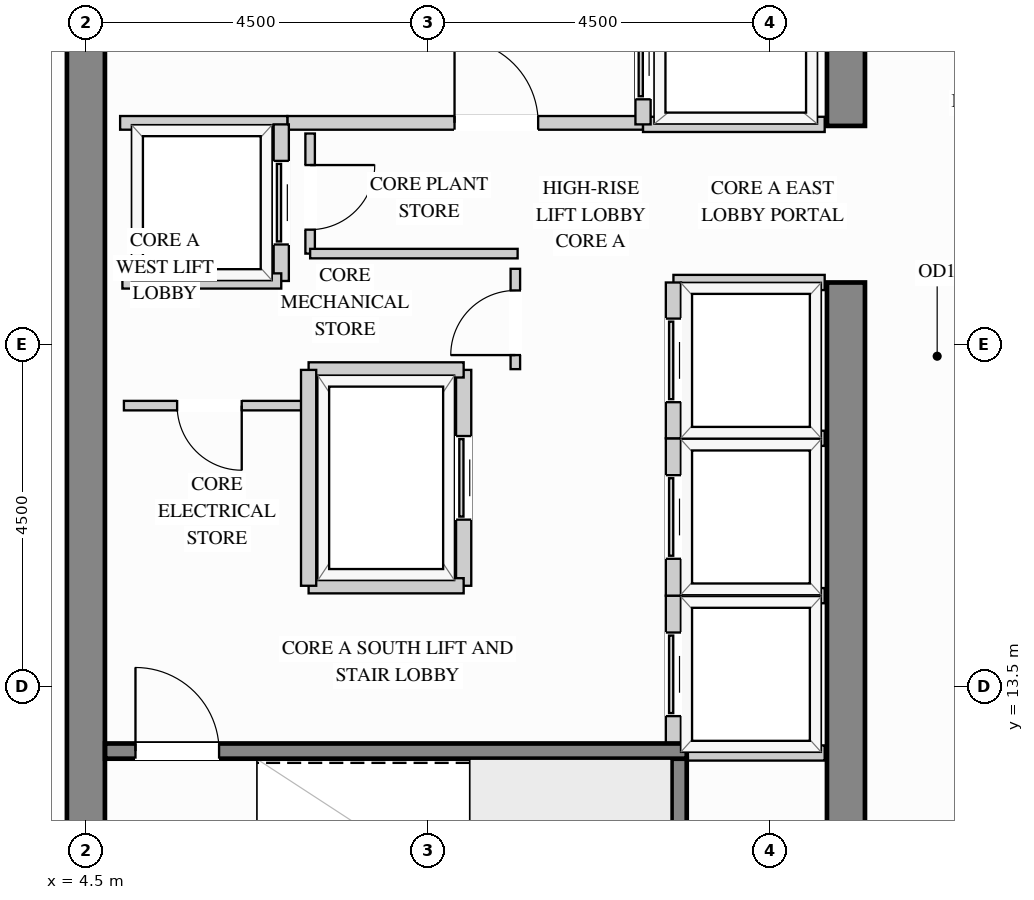
"""IFC4 building model, lengths in metres.
Left out: names, types, materials, properties, quantities, classifications, styles, units other than length and angle.
Written with IfcOpenShell. Run it as: python <this file> out.ifc"""

import sys

from ifc_helpers import new_model, si_unit, direction, frame, frame_2d, origin, place, context, subcontext, project, spatial, rectangle, extrude, source, transform, mapped, element, fill, save


model = new_model("IFC4")
c1 = context("Model", 3, precision=1e-05, world=origin(), true_north=direction((0.0, 1.0)))
c2 = subcontext(c1, "Body", "Model", "MODEL_VIEW")
j1 = project(units=[si_unit("LENGTHUNIT", "METRE"), si_unit("PLANEANGLEUNIT", "RADIAN")], contexts=[c1])
p1 = place(None, origin())
s1 = spatial("IfcSite", under=j1, at=p1, CompositionType="ELEMENT")
p2 = place(p1, origin())
s2 = spatial("IfcBuilding", under=s1, at=p2, CompositionType="ELEMENT")
p3 = place(p2, frame((0.0, 0.0, 262.8)))
s3 = spatial("IfcBuildingStorey", under=s2, at=p3, CompositionType="ELEMENT", Elevation=262.8)
m1 = source(origin(), c2, "Body", "SweptSolid", [
    extrude(rectangle(XDim=10.07, YDim=0.5, at=frame_2d((5.035, 0.0))), origin(), (0.0, 0.0, 1.0), 3.4),
])
p4 = place(p3, frame((14.5, 8.75, 0.0), z_axis=(0.0, 0.0, 1.0), x_axis=(0.0, 1.0, 0.0)))
e1 = element("IfcWall", 1, at=p4, inside=s3, PredefinedType="SHEAR", context=c2, shape_type="MappedRepresentation", body=[
    mapped(m1, transform((0.0, 0.0, 0.0), x_axis=(1.0, 0.0, 0.0), y_axis=(0.0, 1.0, 0.0), z_axis=(0.0, 0.0, 1.0))),
])
m2 = source(origin(), c2, "Body", "SweptSolid", [
    extrude(rectangle(XDim=8.37, YDim=0.5, at=frame_2d((4.185, 0.0))), origin(), (0.0, 0.0, 1.0), 3.4),
])
p5 = place(p3, frame((14.5, 20.88, 0.0), z_axis=(0.0, 0.0, 1.0), x_axis=(0.0, 1.0, 0.0)))
e2 = element("IfcWall", 2, at=p5, inside=s3, PredefinedType="SHEAR", context=c2, shape_type="MappedRepresentation", body=[
    mapped(m2, transform((0.0, 0.0, 0.0), x_axis=(1.0, 0.0, 0.0), y_axis=(0.0, 1.0, 0.0), z_axis=(0.0, 0.0, 1.0))),
])
m3 = source(origin(), c2, "Body", "SweptSolid", [
    extrude(rectangle(XDim=20.5, YDim=0.5, at=frame_2d((10.25, 0.0))), origin(), (0.0, 0.0, 1.0), 3.4),
])
p6 = place(p3, frame((4.5, 8.75, 0.0), z_axis=(0.0, 0.0, 1.0), x_axis=(0.0, 1.0, 0.0)))
e3 = element("IfcWall", 3, at=p6, inside=s3, PredefinedType="SHEAR", context=c2, shape_type="MappedRepresentation", body=[
    mapped(m3, transform((0.0, 0.0, 0.0), x_axis=(1.0, 0.0, 0.0), y_axis=(0.0, 1.0, 0.0), z_axis=(0.0, 0.0, 1.0))),
])
p7 = place(p3, frame((7.15, 20.92, 0.0), z_axis=(0.0, 0.0, 1.0), x_axis=(1.0, 0.0, 0.0)))
e4 = element("IfcWall", 4, at=p7, inside=s3, PredefinedType="PARTITIONING", context=c2, shape_type="SweptSolid", body=[
    extrude(rectangle(XDim=4.68, YDim=0.18, at=frame_2d((2.34, 0.0))), origin(), (0.0, 0.0, 1.0), 3.385),
])
p8 = place(p7, frame((2.2, 0.0, 0.0)))
e5 = element("IfcOpeningElement", 5, at=p8, cuts=e4, PredefinedType="OPENING", context=c2, shape_type="SweptSolid", body=[
    extrude(rectangle(XDim=1.1, YDim=2.15, at=frame_2d((0.55, 1.075))), frame((0.0, 0.1, 0.0), z_axis=(0.0, -1.0, 0.0), x_axis=(1.0, 0.0, 0.0)), (0.0, 0.0, 1.0), 0.2),
])
m4 = source(origin(), c2, "Body", "SweptSolid", [
    extrude(rectangle(XDim=2.2, YDim=0.18, at=frame_2d((1.1, 0.0))), origin(), (0.0, 0.0, 1.0), 3.385),
])
p9 = place(p3, frame((4.95, 20.92, 0.0), z_axis=(0.0, 0.0, 1.0), x_axis=(1.0, 0.0, 0.0)))
e6 = element("IfcWall", 6, at=p9, inside=s3, PredefinedType="PARTITIONING", context=c2, shape_type="MappedRepresentation", body=[
    mapped(m4, transform((0.0, 0.0, 0.0), x_axis=(1.0, 0.0, 0.0), y_axis=(0.0, 1.0, 0.0), z_axis=(0.0, 0.0, 1.0))),
])
p10 = place(p3, frame((10.15, 17.68, 0.0), z_axis=(0.0, 0.0, 1.0), x_axis=(0.0, 1.0, 0.0)))
e7 = element("IfcWall", 7, at=p10, inside=s3, PredefinedType="PARTITIONING", context=c2, shape_type="SweptSolid", body=[
    extrude(rectangle(XDim=1.32, YDim=0.125, at=frame_2d((0.66, 0.0))), origin(), (0.0, 0.0, 1.0), 3.385),
])
p11 = place(p10, frame((0.185, 0.0, 0.0)))
e8 = element("IfcOpeningElement", 8, at=p11, cuts=e7, PredefinedType="OPENING", context=c2, shape_type="SweptSolid", body=[
    extrude(rectangle(XDim=0.85, YDim=2.1, at=frame_2d((0.425, 1.05))), frame((0.0, 0.073, 0.0), z_axis=(0.0, -1.0, 0.0), x_axis=(1.0, 0.0, 0.0)), (0.0, 0.0, 1.0), 0.145),
])
p12 = place(p3, frame((7.45, 19.2, 0.0), z_axis=(0.0, 0.0, 1.0), x_axis=(0.0, 1.0, 0.0)))
e9 = element("IfcWall", 9, at=p12, inside=s3, PredefinedType="PARTITIONING", context=c2, shape_type="SweptSolid", body=[
    extrude(rectangle(XDim=1.58, YDim=0.125, at=frame_2d((0.79, 0.0))), origin(), (0.0, 0.0, 1.0), 3.385),
])
p13 = place(p12, frame((0.315, 0.0, 0.0)))
e10 = element("IfcOpeningElement", 10, at=p13, cuts=e9, PredefinedType="OPENING", context=c2, shape_type="SweptSolid", body=[
    extrude(rectangle(XDim=0.85, YDim=2.1, at=frame_2d((0.425, 1.05))), frame((0.0, 0.073, 0.0), z_axis=(0.0, -1.0, 0.0), x_axis=(1.0, 0.0, 0.0)), (0.0, 0.0, 1.0), 0.145),
])
m5 = source(origin(), c2, "Body", "SweptSolid", [
    extrude(rectangle(XDim=2.73, YDim=0.125, at=frame_2d((1.365, 0.0))), origin(), (0.0, 0.0, 1.0), 3.385),
])
p14 = place(p3, frame((7.45, 19.2, 0.0), z_axis=(0.0, 0.0, 1.0), x_axis=(1.0, 0.0, 0.0)))
e11 = element("IfcWall", 11, at=p14, inside=s3, PredefinedType="PARTITIONING", context=c2, shape_type="MappedRepresentation", body=[
    mapped(m5, transform((0.0, 0.0, 0.0), x_axis=(1.0, 0.0, 0.0), y_axis=(0.0, 1.0, 0.0), z_axis=(0.0, 0.0, 1.0))),
])
p15 = place(p3, frame((5.0, 17.2, 0.0), z_axis=(0.0, 0.0, 1.0), x_axis=(1.0, 0.0, 0.0)))
e12 = element("IfcWall", 12, at=p15, inside=s3, PredefinedType="PARTITIONING", context=c2, shape_type="SweptSolid", body=[
    extrude(rectangle(XDim=2.4, YDim=0.125, at=frame_2d((1.2, 0.0))), origin(), (0.0, 0.0, 1.0), 3.385),
])
p16 = place(p15, frame((0.7, 0.0, 0.0)))
e13 = element("IfcOpeningElement", 13, at=p16, cuts=e12, PredefinedType="OPENING", context=c2, shape_type="SweptSolid", body=[
    extrude(rectangle(XDim=0.85, YDim=2.1, at=frame_2d((0.425, 1.05))), frame((0.0, 0.073, 0.0), z_axis=(0.0, -1.0, 0.0), x_axis=(1.0, 0.0, 0.0)), (0.0, 0.0, 1.0), 0.145),
])
m6 = source(origin(), c2, "Body", "SweptSolid", [
    extrude(rectangle(XDim=2.39, YDim=0.2, at=frame_2d((1.195, 0.0))), origin(), (0.0, 0.0, 1.0), 3.385),
])
p17 = place(p3, frame((11.83, 20.9, 0.0), z_axis=(0.0, 0.0, 1.0), x_axis=(1.0, 0.0, 0.0)))
e14 = element("IfcWall", 14, at=p17, inside=s3, PredefinedType="PARTITIONING", context=c2, shape_type="MappedRepresentation", body=[
    mapped(m6, transform((0.0, 0.0, 0.0), x_axis=(1.0, 0.0, 0.0), y_axis=(0.0, 1.0, 0.0), z_axis=(0.0, 0.0, 1.0))),
])
p18 = place(p3, frame((11.83, 20.9, 0.0), z_axis=(0.0, 0.0, 1.0), x_axis=(0.0, 1.0, 0.0)))
e15 = element("IfcWall", 15, at=p18, inside=s3, PredefinedType="PARTITIONING", context=c2, shape_type="SweptSolid", body=[
    extrude(rectangle(XDim=1.76, YDim=0.2, at=frame_2d((0.88, 0.0))), origin(), (0.0, 0.0, 1.0), 3.385),
])
p19 = place(p18, frame((0.33, 0.0, 0.0)))
e16 = element("IfcOpeningElement", 16, at=p19, cuts=e15, PredefinedType="OPENING", context=c2, shape_type="SweptSolid", body=[
    extrude(rectangle(XDim=1.1, YDim=2.2, at=frame_2d((0.55, 1.1))), frame((0.0, 0.11, 0.0), z_axis=(0.0, -1.0, 0.0), x_axis=(1.0, 0.0, 0.0)), (0.0, 0.0, 1.0), 0.22),
])
m7 = source(origin(), c2, "Body", "SweptSolid", [
    extrude(rectangle(XDim=1.99, YDim=0.2, at=frame_2d((0.995, 0.0))), origin(), (0.0, 0.0, 1.0), 3.385),
])
for number, where, z_axis, x_axis in (
    (17, (12.23, 14.7, 0.0), (0.0, 0.0, 1.0), (1.0, 0.0, 0.0)),
    (18, (12.23, 12.63, 0.0), (0.0, 0.0, 1.0), (1.0, 0.0, 0.0)),
):
    element("IfcWall", number, at=place(p3, frame(where, z_axis=z_axis, x_axis=x_axis)), inside=s3, PredefinedType="PARTITIONING", context=c2, shape_type="MappedRepresentation", body=[
        mapped(m7, transform((0.0, 0.0, 0.0), x_axis=(1.0, 0.0, 0.0), y_axis=(0.0, 1.0, 0.0), z_axis=(0.0, 0.0, 1.0))),
    ])
p20 = place(p3, frame((12.23, 12.63, 0.0), z_axis=(0.0, 0.0, 1.0), x_axis=(0.0, 1.0, 0.0)))
e19 = element("IfcWall", 19, at=p20, inside=s3, PredefinedType="PARTITIONING", context=c2, shape_type="SweptSolid", body=[
    extrude(rectangle(XDim=2.07, YDim=0.2, at=frame_2d((1.035, 0.0))), origin(), (0.0, 0.0, 1.0), 3.385),
])
p21 = place(p20, frame((0.485, 0.0, 0.0)))
e20 = element("IfcOpeningElement", 20, at=p21, cuts=e19, PredefinedType="OPENING", context=c2, shape_type="SweptSolid", body=[
    extrude(rectangle(XDim=1.1, YDim=2.2, at=frame_2d((0.55, 1.1))), frame((0.0, 0.11, 0.0), z_axis=(0.0, -1.0, 0.0), x_axis=(1.0, 0.0, 0.0)), (0.0, 0.0, 1.0), 0.22),
])
p22 = place(p3, frame((12.23, 16.77, 0.0), z_axis=(0.0, 0.0, 1.0), x_axis=(1.0, 0.0, 0.0)))
e21 = element("IfcWall", 21, at=p22, inside=s3, PredefinedType="PARTITIONING", context=c2, shape_type="MappedRepresentation", body=[
    mapped(m7, transform((0.0, 0.0, 0.0), x_axis=(1.0, 0.0, 0.0), y_axis=(0.0, 1.0, 0.0), z_axis=(0.0, 0.0, 1.0))),
])
p23 = place(p3, frame((12.23, 14.7, 0.0), z_axis=(0.0, 0.0, 1.0), x_axis=(0.0, 1.0, 0.0)))
e22 = element("IfcWall", 22, at=p23, inside=s3, PredefinedType="PARTITIONING", context=c2, shape_type="SweptSolid", body=[
    extrude(rectangle(XDim=2.07, YDim=0.2, at=frame_2d((1.035, 0.0))), origin(), (0.0, 0.0, 1.0), 3.385),
])
p24 = place(p23, frame((0.485, 0.0, 0.0)))
e23 = element("IfcOpeningElement", 23, at=p24, cuts=e22, PredefinedType="OPENING", context=c2, shape_type="SweptSolid", body=[
    extrude(rectangle(XDim=1.1, YDim=2.2, at=frame_2d((0.55, 1.1))), frame((0.0, 0.11, 0.0), z_axis=(0.0, -1.0, 0.0), x_axis=(1.0, 0.0, 0.0)), (0.0, 0.0, 1.0), 0.22),
])
p25 = place(p3, frame((12.23, 18.82, 0.0), z_axis=(0.0, 0.0, 1.0), x_axis=(1.0, 0.0, 0.0)))
e24 = element("IfcWall", 24, at=p25, inside=s3, PredefinedType="PARTITIONING", context=c2, shape_type="MappedRepresentation", body=[
    mapped(m7, transform((0.0, 0.0, 0.0), x_axis=(1.0, 0.0, 0.0), y_axis=(0.0, 1.0, 0.0), z_axis=(0.0, 0.0, 1.0))),
])
p26 = place(p3, frame((12.23, 16.77, 0.0), z_axis=(0.0, 0.0, 1.0), x_axis=(0.0, 1.0, 0.0)))
e25 = element("IfcWall", 25, at=p26, inside=s3, PredefinedType="PARTITIONING", context=c2, shape_type="SweptSolid", body=[
    extrude(rectangle(XDim=2.05, YDim=0.2, at=frame_2d((1.025, 0.0))), origin(), (0.0, 0.0, 1.0), 3.385),
])
p27 = place(p26, frame((0.475, 0.0, 0.0)))
e26 = element("IfcOpeningElement", 26, at=p27, cuts=e25, PredefinedType="OPENING", context=c2, shape_type="SweptSolid", body=[
    extrude(rectangle(XDim=1.1, YDim=2.2, at=frame_2d((0.55, 1.1))), frame((0.0, 0.11, 0.0), z_axis=(0.0, -1.0, 0.0), x_axis=(1.0, 0.0, 0.0)), (0.0, 0.0, 1.0), 0.22),
])
p28 = place(p3, frame((7.07, 18.84, 0.0), z_axis=(0.0, 0.0, 1.0), x_axis=(0.0, 1.0, 0.0)))
e27 = element("IfcWall", 27, at=p28, inside=s3, PredefinedType="PARTITIONING", context=c2, shape_type="SweptSolid", body=[
    extrude(rectangle(XDim=2.06, YDim=0.2, at=frame_2d((1.03, 0.0))), origin(), (0.0, 0.0, 1.0), 3.385),
])
p29 = place(p28, frame((0.48, 0.0, 0.0)))
e28 = element("IfcOpeningElement", 28, at=p29, cuts=e27, PredefinedType="OPENING", context=c2, shape_type="SweptSolid", body=[
    extrude(rectangle(XDim=1.1, YDim=2.2, at=frame_2d((0.55, 1.1))), frame((0.0, 0.11, 0.0), z_axis=(0.0, -1.0, 0.0), x_axis=(1.0, 0.0, 0.0)), (0.0, 0.0, 1.0), 0.22),
])
m8 = source(origin(), c2, "Body", "SweptSolid", [
    extrude(rectangle(XDim=2.09, YDim=0.2, at=frame_2d((1.045, 0.0))), origin(), (0.0, 0.0, 1.0), 3.385),
])
p30 = place(p3, frame((4.98, 18.84, 0.0), z_axis=(0.0, 0.0, 1.0), x_axis=(1.0, 0.0, 0.0)))
e29 = element("IfcWall", 29, at=p30, inside=s3, PredefinedType="PARTITIONING", context=c2, shape_type="MappedRepresentation", body=[
    mapped(m8, transform((0.0, 0.0, 0.0), x_axis=(1.0, 0.0, 0.0), y_axis=(0.0, 1.0, 0.0), z_axis=(0.0, 0.0, 1.0))),
])
p31 = place(p3, frame((9.47, 14.83, 0.0), z_axis=(0.0, 0.0, 1.0), x_axis=(0.0, 1.0, 0.0)))
e30 = element("IfcWall", 30, at=p31, inside=s3, PredefinedType="PARTITIONING", context=c2, shape_type="SweptSolid", body=[
    extrude(rectangle(XDim=2.84, YDim=0.2, at=frame_2d((1.42, 0.0))), origin(), (0.0, 0.0, 1.0), 3.385),
])
p32 = place(p31, frame((0.87, 0.0, 0.0)))
e31 = element("IfcOpeningElement", 31, at=p32, cuts=e30, PredefinedType="OPENING", context=c2, shape_type="SweptSolid", body=[
    extrude(rectangle(XDim=1.1, YDim=2.2, at=frame_2d((0.55, 1.1))), frame((0.0, 0.11, 0.0), z_axis=(0.0, -1.0, 0.0), x_axis=(1.0, 0.0, 0.0)), (0.0, 0.0, 1.0), 0.22),
])
m9 = source(origin(), c2, "Body", "SweptSolid", [
    extrude(rectangle(XDim=2.04, YDim=0.2, at=frame_2d((1.02, 0.0))), origin(), (0.0, 0.0, 1.0), 3.385),
])
for number, where, z_axis, x_axis in (
    (32, (7.43, 17.67, 0.0), (0.0, 0.0, 1.0), (1.0, 0.0, 0.0)),
    (33, (7.43, 14.83, 0.0), (0.0, 0.0, 1.0), (1.0, 0.0, 0.0)),
):
    element("IfcWall", number, at=place(p3, frame(where, z_axis=z_axis, x_axis=x_axis)), inside=s3, PredefinedType="PARTITIONING", context=c2, shape_type="MappedRepresentation", body=[
        mapped(m9, transform((0.0, 0.0, 0.0), x_axis=(1.0, 0.0, 0.0), y_axis=(0.0, 1.0, 0.0), z_axis=(0.0, 0.0, 1.0))),
    ])
m10 = source(origin(), c2, "Body", "SweptSolid", [
    extrude(rectangle(XDim=2.84, YDim=0.2, at=frame_2d((1.42, 0.0))), origin(), (0.0, 0.0, 1.0), 3.385),
])
p33 = place(p3, frame((7.43, 14.83, 0.0), z_axis=(0.0, 0.0, 1.0), x_axis=(0.0, 1.0, 0.0)))
e34 = element("IfcWall", 34, at=p33, inside=s3, PredefinedType="PARTITIONING", context=c2, shape_type="MappedRepresentation", body=[
    mapped(m10, transform((0.0, 0.0, 0.0), x_axis=(1.0, 0.0, 0.0), y_axis=(0.0, 1.0, 0.0), z_axis=(0.0, 0.0, 1.0))),
])
m11 = source(origin(), c2, "Body", "SweptSolid", [
    extrude(rectangle(XDim=3.803, YDim=0.2, at=frame_2d((1.901, 0.0))), origin(), (0.0, 0.0, 1.0), 3.4),
])
p34 = place(p3, frame((12.305, 8.752, 0.0), z_axis=(0.0, 0.0, 1.0), x_axis=(0.0, 1.0, 0.0)))
e35 = element("IfcWall", 35, at=p34, inside=s3, PredefinedType="SHEAR", context=c2, shape_type="MappedRepresentation", body=[
    mapped(m11, transform((0.0, 0.0, 0.0), x_axis=(1.0, 0.0, 0.0), y_axis=(0.0, 1.0, 0.0), z_axis=(0.0, 0.0, 1.0))),
])
p35 = place(p3, frame((4.752, 12.655, 0.0), z_axis=(0.0, 0.0, 1.0), x_axis=(1.0, 0.0, 0.0)))
e36 = element("IfcWall", 36, at=p35, inside=s3, PredefinedType="SHEAR", context=c2, shape_type="SweptSolid", body=[
    extrude(rectangle(XDim=7.653, YDim=0.2, at=frame_2d((3.827, 0.0))), origin(), (0.0, 0.0, 1.0), 3.4),
])
p36 = place(p35, frame((0.4, 0.0, 0.0)))
e37 = element("IfcOpeningElement", 37, at=p36, cuts=e36, PredefinedType="OPENING", context=c2, shape_type="SweptSolid", body=[
    extrude(rectangle(XDim=1.1, YDim=2.15, at=frame_2d((0.55, 1.075))), frame((0.0, 0.11, 0.0), z_axis=(0.0, -1.0, 0.0), x_axis=(1.0, 0.0, 0.0)), (0.0, 0.0, 1.0), 0.22),
])
m12 = source(origin(), c2, "Body", "SweptSolid", [
    extrude(rectangle(XDim=1.1, YDim=2.15, at=frame_2d((0.55, 1.075))), frame((0.0, 0.025, 0.0), z_axis=(0.0, -1.0, 0.0), x_axis=(1.0, 0.0, 0.0)), (0.0, 0.0, 1.0), 0.05),
])
p37 = place(p8, origin())
e38 = element("IfcDoor", 38, at=p37, inside=s3, OperationType="SINGLE_SWING_LEFT", PredefinedType="DOOR", context=c2, shape_type="MappedRepresentation", body=[
    mapped(m12, transform((0.0, 0.0, 0.0), x_axis=(1.0, 0.0, 0.0), y_axis=(0.0, 1.0, 0.0), z_axis=(0.0, 0.0, 1.0))),
])
fill(e5, e38)
m13 = source(origin(), c2, "Body", "SweptSolid", [
    extrude(rectangle(XDim=1.1, YDim=2.2, at=frame_2d((0.55, 1.1))), frame((0.0, 0.025, 0.0), z_axis=(0.0, -1.0, 0.0), x_axis=(1.0, 0.0, 0.0)), (0.0, 0.0, 1.0), 0.05),
])
p38 = place(p19, origin())
e39 = element("IfcDoor", 39, at=p38, inside=s3, OperationType="SLIDING_TO_LEFT", PredefinedType="DOOR", context=c2, shape_type="MappedRepresentation", body=[
    mapped(m13, transform((0.0, 0.0, 0.0), x_axis=(1.0, 0.0, 0.0), y_axis=(0.0, 1.0, 0.0), z_axis=(0.0, 0.0, 1.0))),
])
fill(e16, e39)
p39 = place(p21, origin())
e40 = element("IfcDoor", 40, at=p39, inside=s3, OperationType="SLIDING_TO_LEFT", PredefinedType="DOOR", context=c2, shape_type="MappedRepresentation", body=[
    mapped(m13, transform((0.0, 0.0, 0.0), x_axis=(1.0, 0.0, 0.0), y_axis=(0.0, 1.0, 0.0), z_axis=(0.0, 0.0, 1.0))),
])
fill(e20, e40)
p40 = place(p24, origin())
e41 = element("IfcDoor", 41, at=p40, inside=s3, OperationType="SLIDING_TO_LEFT", PredefinedType="DOOR", context=c2, shape_type="MappedRepresentation", body=[
    mapped(m13, transform((0.0, 0.0, 0.0), x_axis=(1.0, 0.0, 0.0), y_axis=(0.0, 1.0, 0.0), z_axis=(0.0, 0.0, 1.0))),
])
fill(e23, e41)
p41 = place(p27, origin())
e42 = element("IfcDoor", 42, at=p41, inside=s3, OperationType="SLIDING_TO_LEFT", PredefinedType="DOOR", context=c2, shape_type="MappedRepresentation", body=[
    mapped(m13, transform((0.0, 0.0, 0.0), x_axis=(1.0, 0.0, 0.0), y_axis=(0.0, 1.0, 0.0), z_axis=(0.0, 0.0, 1.0))),
])
fill(e26, e42)
p42 = place(p29, origin())
e43 = element("IfcDoor", 43, at=p42, inside=s3, OperationType="SLIDING_TO_LEFT", PredefinedType="DOOR", context=c2, shape_type="MappedRepresentation", body=[
    mapped(m13, transform((0.0, 0.0, 0.0), x_axis=(1.0, 0.0, 0.0), y_axis=(0.0, 1.0, 0.0), z_axis=(0.0, 0.0, 1.0))),
])
fill(e28, e43)
p43 = place(p32, origin())
e44 = element("IfcDoor", 44, at=p43, inside=s3, OperationType="SLIDING_TO_LEFT", PredefinedType="DOOR", context=c2, shape_type="MappedRepresentation", body=[
    mapped(m13, transform((0.0, 0.0, 0.0), x_axis=(1.0, 0.0, 0.0), y_axis=(0.0, 1.0, 0.0), z_axis=(0.0, 0.0, 1.0))),
])
fill(e31, e44)
m14 = source(origin(), c2, "Body", "SweptSolid", [
    extrude(rectangle(XDim=0.85, YDim=2.1, at=frame_2d((0.425, 1.05))), frame((0.0, 0.025, 0.0), z_axis=(0.0, -1.0, 0.0), x_axis=(1.0, 0.0, 0.0)), (0.0, 0.0, 1.0), 0.05),
])
p44 = place(p11, origin())
e45 = element("IfcDoor", 45, at=p44, inside=s3, OperationType="SINGLE_SWING_LEFT", PredefinedType="DOOR", context=c2, shape_type="MappedRepresentation", body=[
    mapped(m14, transform((0.0, 0.0, 0.0), x_axis=(1.0, 0.0, 0.0), y_axis=(0.0, 1.0, 0.0), z_axis=(0.0, 0.0, 1.0))),
])
fill(e8, e45)
p45 = place(p16, origin())
e46 = element("IfcDoor", 46, at=p45, inside=s3, OperationType="SINGLE_SWING_RIGHT", PredefinedType="DOOR", context=c2, shape_type="MappedRepresentation", body=[
    mapped(m14, transform((0.0, 0.0, 0.0), x_axis=(1.0, 0.0, 0.0), y_axis=(0.0, 1.0, 0.0), z_axis=(0.0, 0.0, 1.0))),
])
fill(e13, e46)
p46 = place(p13, origin())
e47 = element("IfcDoor", 47, at=p46, inside=s3, OperationType="SINGLE_SWING_RIGHT", PredefinedType="DOOR", context=c2, shape_type="MappedRepresentation", body=[
    mapped(m14, transform((0.0, 0.0, 0.0), x_axis=(1.0, 0.0, 0.0), y_axis=(0.0, 1.0, 0.0), z_axis=(0.0, 0.0, 1.0))),
])
fill(e10, e47)
m15 = source(origin(), c2, "Body", "SweptSolid", [
    extrude(rectangle(XDim=1.1, YDim=2.15, at=frame_2d((0.55, 1.075))), frame((0.0, 0.025, 0.0), z_axis=(0.0, -1.0, 0.0), x_axis=(1.0, 0.0, 0.0)), (0.0, 0.0, 1.0), 0.05),
])
p47 = place(p36, origin())
e48 = element("IfcDoor", 48, at=p47, inside=s3, OperationType="SINGLE_SWING_LEFT", PredefinedType="DOOR", context=c2, shape_type="MappedRepresentation", body=[
    mapped(m15, transform((0.0, 0.0, 0.0), x_axis=(1.0, 0.0, 0.0), y_axis=(0.0, 1.0, 0.0), z_axis=(0.0, 0.0, 1.0))),
])
fill(e37, e48)
save(model, sys.argv[1])
